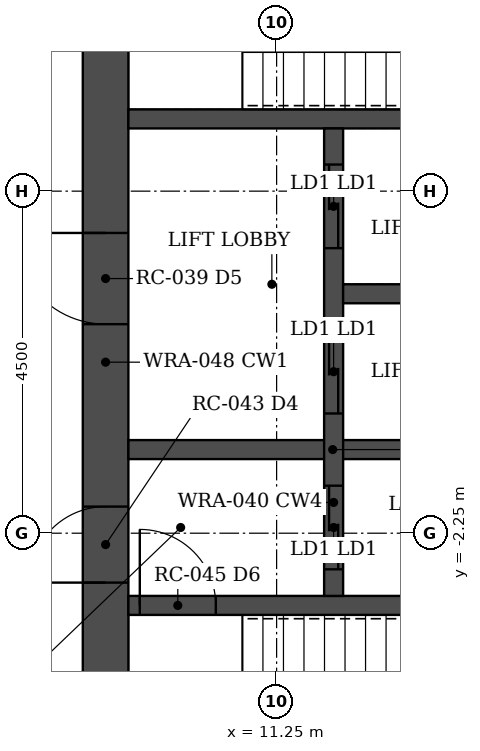
"""IFC4 building model, lengths in metres.
Left out: names, types, materials, properties, quantities, classifications, styles, units other than length and angle.
Written with IfcOpenShell. Run it as: python <this file> out.ifc"""

import sys

from ifc_helpers import new_model, si_unit, direction, frame, frame_2d, origin, place, context, subcontext, project, spatial, rectangle, extrude, element, fill, save


model = new_model("IFC4")
c1 = context("Model", 3, precision=1e-05, world=origin(), true_north=direction((0.0, 1.0)))
c2 = subcontext(c1, "Body", "Model", "MODEL_VIEW")
j1 = project(units=[si_unit("LENGTHUNIT", "METRE"), si_unit("PLANEANGLEUNIT", "RADIAN")], contexts=[c1])
p1 = place(None, origin())
s1 = spatial("IfcSite", under=j1, at=p1, CompositionType="ELEMENT")
p2 = place(p1, origin())
s2 = spatial("IfcBuilding", under=s1, at=p2, CompositionType="ELEMENT")
p3 = place(p2, frame((0.0, 0.0, 47.5)))
s3 = spatial("IfcBuildingStorey", under=s2, at=p3, CompositionType="ELEMENT", Elevation=47.5)
p4 = place(p3, frame((9.0, -6.45, 0.0), z_axis=(0.0, 0.0, 1.0), x_axis=(0.0, 1.0, 0.0)))
e1 = element("IfcWall", 1, at=p4, inside=s3, PredefinedType="SHEAR", context=c2, shape_type="SweptSolid", body=[
    extrude(rectangle(XDim=12.9, YDim=0.6, at=frame_2d((6.45, 0.0))), origin(), (0.0, 0.0, 1.0), 3.5),
])
p5 = place(p4, frame((3.55, 0.0, 0.0)))
e2 = element("IfcOpeningElement", 2, at=p5, cuts=e1, PredefinedType="OPENING", context=c2, shape_type="SweptSolid", body=[
    extrude(rectangle(XDim=1.0, YDim=2.1, at=frame_2d((0.5, 1.05))), frame((0.0, 0.31, 0.0), z_axis=(0.0, -1.0, 0.0), x_axis=(1.0, 0.0, 0.0)), (0.0, 0.0, 1.0), 0.62),
])
p6 = place(p4, frame((6.95, 0.0, 0.0)))
e3 = element("IfcOpeningElement", 3, at=p6, cuts=e1, PredefinedType="OPENING", context=c2, shape_type="SweptSolid", body=[
    extrude(rectangle(XDim=1.2, YDim=2.1, at=frame_2d((0.6, 1.05))), frame((0.0, 0.31, 0.0), z_axis=(0.0, -1.0, 0.0), x_axis=(1.0, 0.0, 0.0)), (0.0, 0.0, 1.0), 0.62),
])
p7 = place(p4, frame((10.85, 0.0, 0.0)))
e4 = element("IfcOpeningElement", 4, at=p7, cuts=e1, PredefinedType="OPENING", context=c2, shape_type="SweptSolid", body=[
    extrude(rectangle(XDim=1.0, YDim=2.1, at=frame_2d((0.5, 1.05))), frame((0.0, 0.31, 0.0), z_axis=(0.0, -1.0, 0.0), x_axis=(1.0, 0.0, 0.0)), (0.0, 0.0, 1.0), 0.62),
])
p8 = place(p3, frame((9.3, -3.2, 0.0), z_axis=(0.0, 0.0, 1.0), x_axis=(1.0, 0.0, 0.0)))
e5 = element("IfcWall", 5, at=p8, inside=s3, PredefinedType="SHEAR", context=c2, shape_type="SweptSolid", body=[
    extrude(rectangle(XDim=8.4, YDim=0.25, at=frame_2d((4.2, 0.0))), origin(), (0.0, 0.0, 1.0), 3.5),
])
p9 = place(p8, frame((0.15, 0.0, 0.0)))
e6 = element("IfcOpeningElement", 6, at=p9, cuts=e5, PredefinedType="OPENING", context=c2, shape_type="SweptSolid", body=[
    extrude(rectangle(XDim=1.0, YDim=2.1, at=frame_2d((0.5, 1.05))), frame((0.0, 0.135, 0.0), z_axis=(0.0, -1.0, 0.0), x_axis=(1.0, 0.0, 0.0)), (0.0, 0.0, 1.0), 0.27),
])
p10 = place(p3, frame((9.3, 3.2, 0.0), z_axis=(0.0, 0.0, 1.0), x_axis=(1.0, 0.0, 0.0)))
e7 = element("IfcWall", 7, at=p10, inside=s3, PredefinedType="SHEAR", context=c2, shape_type="SweptSolid", body=[
    extrude(rectangle(XDim=8.4, YDim=0.25, at=frame_2d((4.2, 0.0))), origin(), (0.0, 0.0, 1.0), 3.5),
])
p11 = place(p3, frame((9.3, -1.15, 0.0), z_axis=(0.0, 0.0, 1.0), x_axis=(1.0, 0.0, 0.0)))
e8 = element("IfcWall", 8, at=p11, inside=s3, PredefinedType="SHEAR", context=c2, shape_type="SweptSolid", body=[
    extrude(rectangle(XDim=5.375, YDim=0.25, at=frame_2d((2.688, 0.0))), origin(), (0.0, 0.0, 1.0), 3.5),
])
p12 = place(p3, frame((12.0, -3.075, 0.0), z_axis=(0.0, 0.0, 1.0), x_axis=(0.0, 1.0, 0.0)))
e9 = element("IfcWall", 9, at=p12, inside=s3, PredefinedType="SHEAR", context=c2, shape_type="SweptSolid", body=[
    extrude(rectangle(XDim=6.15, YDim=0.25, at=frame_2d((3.075, 0.0))), origin(), (0.0, 0.0, 1.0), 3.5),
])
p13 = place(p12, frame((0.35, 0.0, 0.0)))
e10 = element("IfcOpeningElement", 10, at=p13, cuts=e9, PredefinedType="OPENING", context=c2, shape_type="SweptSolid", body=[
    extrude(rectangle(XDim=1.1, YDim=2.1, at=frame_2d((0.55, 1.05))), frame((0.0, 0.135, 0.0), z_axis=(0.0, -1.0, 0.0), x_axis=(1.0, 0.0, 0.0)), (0.0, 0.0, 1.0), 0.27),
])
p14 = place(p12, frame((2.4, 0.0, 0.0)))
e11 = element("IfcOpeningElement", 11, at=p14, cuts=e9, PredefinedType="OPENING", context=c2, shape_type="SweptSolid", body=[
    extrude(rectangle(XDim=1.1, YDim=2.1, at=frame_2d((0.55, 1.05))), frame((0.0, 0.135, 0.0), z_axis=(0.0, -1.0, 0.0), x_axis=(1.0, 0.0, 0.0)), (0.0, 0.0, 1.0), 0.27),
])
p15 = place(p12, frame((4.575, 0.0, 0.0)))
e12 = element("IfcOpeningElement", 12, at=p15, cuts=e9, PredefinedType="OPENING", context=c2, shape_type="SweptSolid", body=[
    extrude(rectangle(XDim=1.1, YDim=2.1, at=frame_2d((0.55, 1.05))), frame((0.0, 0.135, 0.0), z_axis=(0.0, -1.0, 0.0), x_axis=(1.0, 0.0, 0.0)), (0.0, 0.0, 1.0), 0.27),
])
p16 = place(p3, frame((12.125, 0.9, 0.0), z_axis=(0.0, 0.0, 1.0), x_axis=(1.0, 0.0, 0.0)))
e13 = element("IfcWall", 13, at=p16, inside=s3, PredefinedType="SHEAR", context=c2, shape_type="SweptSolid", body=[
    extrude(rectangle(XDim=2.55, YDim=0.25, at=frame_2d((1.275, 0.0))), origin(), (0.0, 0.0, 1.0), 3.5),
])
p17 = place(p5, origin())
e14 = element("IfcDoor", 14, at=p17, inside=s3, OperationType="SINGLE_SWING_LEFT", PredefinedType="DOOR", context=c2, shape_type="SweptSolid", body=[
    extrude(rectangle(XDim=1.0, YDim=2.1, at=frame_2d((0.5, 1.05))), frame((0.0, 0.025, 0.0), z_axis=(0.0, -1.0, 0.0), x_axis=(1.0, 0.0, 0.0)), (0.0, 0.0, 1.0), 0.05),
])
fill(e2, e14)
p18 = place(p9, origin())
e15 = element("IfcDoor", 15, at=p18, inside=s3, OperationType="SINGLE_SWING_LEFT", PredefinedType="DOOR", context=c2, shape_type="SweptSolid", body=[
    extrude(rectangle(XDim=1.0, YDim=2.1, at=frame_2d((0.5, 1.05))), frame((0.0, 0.025, 0.0), z_axis=(0.0, -1.0, 0.0), x_axis=(1.0, 0.0, 0.0)), (0.0, 0.0, 1.0), 0.05),
])
fill(e6, e15)
p19 = place(p6, origin())
e16 = element("IfcDoor", 16, at=p19, inside=s3, OperationType="SINGLE_SWING_RIGHT", PredefinedType="DOOR", context=c2, shape_type="SweptSolid", body=[
    extrude(rectangle(XDim=1.2, YDim=2.1, at=frame_2d((0.6, 1.05))), frame((0.0, 0.025, 0.0), z_axis=(0.0, -1.0, 0.0), x_axis=(1.0, 0.0, 0.0)), (0.0, 0.0, 1.0), 0.05),
])
fill(e3, e16)
p20 = place(p13, origin())
e17 = element("IfcDoor", 17, at=p20, inside=s3, OperationType="DOUBLE_DOOR_SLIDING", PredefinedType="DOOR", context=c2, shape_type="SweptSolid", body=[
    extrude(rectangle(XDim=1.1, YDim=2.1, at=frame_2d((0.55, 1.05))), frame((0.0, 0.025, 0.0), z_axis=(0.0, -1.0, 0.0), x_axis=(1.0, 0.0, 0.0)), (0.0, 0.0, 1.0), 0.05),
])
fill(e10, e17)
p21 = place(p14, origin())
e18 = element("IfcDoor", 18, at=p21, inside=s3, OperationType="DOUBLE_DOOR_SLIDING", PredefinedType="DOOR", context=c2, shape_type="SweptSolid", body=[
    extrude(rectangle(XDim=1.1, YDim=2.1, at=frame_2d((0.55, 1.05))), frame((0.0, 0.025, 0.0), z_axis=(0.0, -1.0, 0.0), x_axis=(1.0, 0.0, 0.0)), (0.0, 0.0, 1.0), 0.05),
])
fill(e11, e18)
p22 = place(p15, origin())
e19 = element("IfcDoor", 19, at=p22, inside=s3, OperationType="DOUBLE_DOOR_SLIDING", PredefinedType="DOOR", context=c2, shape_type="SweptSolid", body=[
    extrude(rectangle(XDim=1.1, YDim=2.1, at=frame_2d((0.55, 1.05))), frame((0.0, 0.025, 0.0), z_axis=(0.0, -1.0, 0.0), x_axis=(1.0, 0.0, 0.0)), (0.0, 0.0, 1.0), 0.05),
])
fill(e12, e19)
save(model, sys.argv[1])
